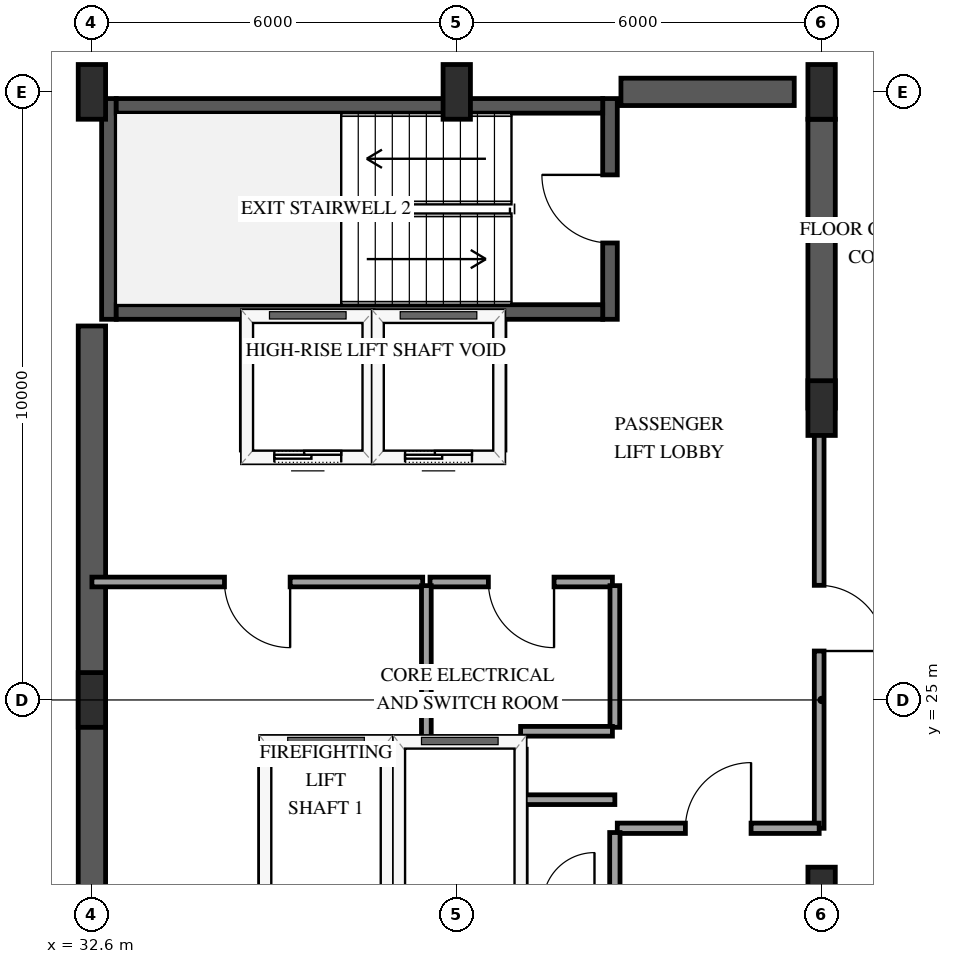
"""IFC4 building model, lengths in metres.
Left out: names, types, materials, properties, quantities, classifications, styles, units other than length and angle.
Written with IfcOpenShell. Run it as: python <this file> out.ifc"""

import sys

from ifc_helpers import new_model, si_unit, direction, frame, frame_2d, origin, origin_2d, place, context, subcontext, project, spatial, rectangle, extrude, element, fill, save


model = new_model("IFC4")
c1 = context("Model", 3, precision=1e-05, world=origin(), true_north=direction((0.0, 1.0)))
c2 = subcontext(c1, "Body", "Model", "MODEL_VIEW")
j1 = project(units=[si_unit("LENGTHUNIT", "METRE"), si_unit("PLANEANGLEUNIT", "RADIAN")], contexts=[c1])
p1 = place(None, origin())
s1 = spatial("IfcSite", under=j1, at=p1, CompositionType="ELEMENT")
p2 = place(p1, origin())
s2 = spatial("IfcBuilding", under=s1, at=p2, CompositionType="ELEMENT")
p3 = place(p2, frame((0.0, 0.0, 257.5)))
s3 = spatial("IfcBuildingStorey", under=s2, at=p3, CompositionType="ELEMENT", Elevation=257.5)
p4 = place(p3, frame((32.88, 31.26, 0.0), z_axis=(0.0, 0.0, 1.0), x_axis=(0.0, 1.0, 0.0)))
e1 = element("IfcWall", 1, at=p4, inside=s3, PredefinedType="SHEAR", context=c2, shape_type="SweptSolid", body=[
    extrude(rectangle(XDim=3.63, YDim=0.24, at=frame_2d((1.815, 0.0))), origin(), (0.0, 0.0, 1.0), 3.75),
])
p5 = place(p3, frame((41.12, 31.26, 0.0), z_axis=(0.0, 0.0, 1.0), x_axis=(0.0, 1.0, 0.0)))
e2 = element("IfcWall", 2, at=p5, inside=s3, PredefinedType="SHEAR", context=c2, shape_type="SweptSolid", body=[
    extrude(rectangle(XDim=3.63, YDim=0.24, at=frame_2d((1.815, 0.0))), origin(), (0.0, 0.0, 1.0), 3.75),
])
p6 = place(p5, frame((1.255, 0.0, 0.0)))
e3 = element("IfcOpeningElement", 3, at=p6, cuts=e2, PredefinedType="OPENING", context=c2, shape_type="SweptSolid", body=[
    extrude(rectangle(XDim=1.12, YDim=2.15, at=frame_2d((0.56, 1.075))), frame((0.0, 0.13, 0.0), z_axis=(0.0, -1.0, 0.0), x_axis=(1.0, 0.0, 0.0)), (0.0, 0.0, 1.0), 0.26),
])
for number, where, z_axis, x_axis in (
    (4, (33.0, 31.38, 0.0), (0.0, 0.0, 1.0), (1.0, 0.0, 0.0)),
    (5, (33.0, 34.77, 0.0), (0.0, 0.0, 1.0), (1.0, 0.0, 0.0)),
):
    element("IfcWall", number, at=place(p3, frame(where, z_axis=z_axis, x_axis=x_axis)), inside=s3, PredefinedType="SHEAR", context=c2, shape_type="SweptSolid", body=[
        extrude(rectangle(XDim=8.0, YDim=0.24, at=frame_2d((4.0, 0.0))), origin(), (0.0, 0.0, 1.0), 3.75),
    ])
p7 = place(p3, frame((32.6, 18.85, 0.0), z_axis=(0.0, 0.0, 1.0), x_axis=(0.0, 1.0, 0.0)))
e6 = element("IfcWall", 6, at=p7, inside=s3, PredefinedType="SHEAR", context=c2, shape_type="SweptSolid", body=[
    extrude(rectangle(XDim=12.3, YDim=0.45, at=frame_2d((6.15, 0.0))), origin(), (0.0, 0.0, 1.0), 3.75),
])
p8 = place(p3, frame((41.3, 35.0, 0.0), z_axis=(0.0, 0.0, 1.0), x_axis=(1.0, 0.0, 0.0)))
e7 = element("IfcWall", 7, at=p8, inside=s3, PredefinedType="SHEAR", context=c2, shape_type="SweptSolid", body=[
    extrude(rectangle(XDim=2.85, YDim=0.45, at=frame_2d((1.425, 0.0))), origin(), (0.0, 0.0, 1.0), 3.75),
])
p9 = place(p3, frame((44.6, 29.8, 0.0), z_axis=(0.0, 0.0, 1.0), x_axis=(0.0, 1.0, 0.0)))
e8 = element("IfcWall", 8, at=p9, inside=s3, PredefinedType="SHEAR", context=c2, shape_type="SweptSolid", body=[
    extrude(rectangle(XDim=4.75, YDim=0.45, at=frame_2d((2.375, 0.0))), origin(), (0.0, 0.0, 1.0), 3.75),
])
for number, where, z_axis, x_axis in (
    (9, (32.6, 25.0, 0.0), (0.0, 0.0, 1.0), (1.0, 0.0, 0.0)),
    (10, (32.6, 35.0, 0.0), (0.0, 0.0, 1.0), (1.0, 0.0, 0.0)),
    (11, (38.6, 35.0, 0.0), (0.0, 0.0, 1.0), (1.0, 0.0, 0.0)),
    (12, (44.6, 21.8, 0.0), (0.0, 0.0, 1.0), (1.0, 0.0, 0.0)),
    (13, (44.6, 29.8, 0.0), (0.0, 0.0, 1.0), (1.0, 0.0, 0.0)),
    (14, (44.6, 35.0, 0.0), (0.0, 0.0, 1.0), (1.0, 0.0, 0.0)),
):
    element("IfcColumn", number, at=place(p3, frame(where, z_axis=z_axis, x_axis=x_axis)), inside=s3, PredefinedType="PILASTER", context=c2, shape_type="SweptSolid", body=[
        extrude(rectangle(XDim=0.45, YDim=0.9, at=origin_2d()), origin(), (0.0, 0.0, 1.0), 3.75),
    ])
p10 = place(p3, frame((35.45, 24.3, 0.0), z_axis=(0.0, 0.0, 1.0), x_axis=(1.0, 0.0, 0.0)))
e15 = element("IfcWall", 15, at=p10, inside=s3, PredefinedType="SOLIDWALL", context=c2, shape_type="SweptSolid", body=[
    extrude(rectangle(XDim=2.0, YDim=0.185, at=frame_2d((1.0, 0.0))), origin(), (0.0, 0.0, 1.0), 2.824),
])
for number, where, z_axis, x_axis in (
    (16, (35.45, 21.81, 0.0), (0.0, 0.0, 1.0), (0.0, 1.0, 0.0)),
    (17, (37.45, 21.81, 0.0), (0.0, 0.0, 1.0), (0.0, 1.0, 0.0)),
):
    element("IfcWall", number, at=place(p3, frame(where, z_axis=z_axis, x_axis=x_axis)), inside=s3, PredefinedType="SOLIDWALL", context=c2, shape_type="SweptSolid", body=[
        extrude(rectangle(XDim=2.38, YDim=0.185, at=frame_2d((1.19, 0.0))), origin(), (0.0, 0.0, 1.0), 3.45),
    ])
p11 = place(p3, frame((37.65, 24.3, 0.0), z_axis=(0.0, 0.0, 1.0), x_axis=(1.0, 0.0, 0.0)))
e18 = element("IfcWall", 18, at=p11, inside=s3, PredefinedType="SOLIDWALL", context=c2, shape_type="SweptSolid", body=[
    extrude(rectangle(XDim=2.0, YDim=0.185, at=frame_2d((1.0, 0.0))), origin(), (0.0, 0.0, 1.0), 2.824),
])
p12 = place(p3, frame((39.65, 21.81, 0.0), z_axis=(0.0, 0.0, 1.0), x_axis=(0.0, 1.0, 0.0)))
e19 = element("IfcWall", 19, at=p12, inside=s3, PredefinedType="SOLIDWALL", context=c2, shape_type="SweptSolid", body=[
    extrude(rectangle(XDim=2.38, YDim=0.185, at=frame_2d((1.19, 0.0))), origin(), (0.0, 0.0, 1.0), 3.45),
])
p13 = place(p3, frame((35.15, 29.0, 0.0), z_axis=(0.0, 0.0, 1.0), x_axis=(1.0, 0.0, 0.0)))
e20 = element("IfcWall", 20, at=p13, inside=s3, PredefinedType="SOLIDWALL", context=c2, shape_type="SweptSolid", body=[
    extrude(rectangle(XDim=2.0, YDim=0.185, at=frame_2d((1.0, 0.0))), origin(), (0.0, 0.0, 1.0), 3.45),
])
p14 = place(p13, frame((0.45, 0.0, 0.0)))
e21 = element("IfcOpeningElement", 21, at=p14, cuts=e20, PredefinedType="OPENING", context=c2, shape_type="SweptSolid", body=[
    extrude(rectangle(XDim=1.1, YDim=2.15, at=frame_2d((0.55, 1.075))), frame((0.0, 0.103, 0.0), z_axis=(0.0, -1.0, 0.0), x_axis=(1.0, 0.0, 0.0)), (0.0, 0.0, 1.0), 0.205),
])
for number, where, z_axis, x_axis in (
    (22, (35.15, 29.11, 0.0), (0.0, 0.0, 1.0), (0.0, 1.0, 0.0)),
    (23, (37.15, 29.11, 0.0), (0.0, 0.0, 1.0), (0.0, 1.0, 0.0)),
):
    element("IfcWall", number, at=place(p3, frame(where, z_axis=z_axis, x_axis=x_axis)), inside=s3, PredefinedType="SOLIDWALL", context=c2, shape_type="SweptSolid", body=[
        extrude(rectangle(XDim=2.1, YDim=0.185, at=frame_2d((1.05, 0.0))), origin(), (0.0, 0.0, 1.0), 3.45),
    ])
p15 = place(p3, frame((37.3, 29.0, 0.0), z_axis=(0.0, 0.0, 1.0), x_axis=(1.0, 0.0, 0.0)))
e24 = element("IfcWall", 24, at=p15, inside=s3, PredefinedType="SOLIDWALL", context=c2, shape_type="SweptSolid", body=[
    extrude(rectangle(XDim=2.0, YDim=0.185, at=frame_2d((1.0, 0.0))), origin(), (0.0, 0.0, 1.0), 3.45),
])
p16 = place(p15, frame((0.45, 0.0, 0.0)))
e25 = element("IfcOpeningElement", 25, at=p16, cuts=e24, PredefinedType="OPENING", context=c2, shape_type="SweptSolid", body=[
    extrude(rectangle(XDim=1.1, YDim=2.15, at=frame_2d((0.55, 1.075))), frame((0.0, 0.103, 0.0), z_axis=(0.0, -1.0, 0.0), x_axis=(1.0, 0.0, 0.0)), (0.0, 0.0, 1.0), 0.205),
])
p17 = place(p3, frame((39.3, 29.11, 0.0), z_axis=(0.0, 0.0, 1.0), x_axis=(0.0, 1.0, 0.0)))
e26 = element("IfcWall", 26, at=p17, inside=s3, PredefinedType="SOLIDWALL", context=c2, shape_type="SweptSolid", body=[
    extrude(rectangle(XDim=2.1, YDim=0.185, at=frame_2d((1.05, 0.0))), origin(), (0.0, 0.0, 1.0), 3.45),
])
p18 = place(p3, frame((44.56, 29.8, 0.0), z_axis=(0.0, 0.0, 1.0), x_axis=(0.0, -1.0, 0.0)))
e27 = element("IfcWall", 27, at=p18, inside=s3, PredefinedType="PARTITIONING", context=c2, shape_type="SweptSolid", body=[
    extrude(rectangle(XDim=6.91, YDim=0.16, at=frame_2d((3.455, 0.0))), origin(), (0.0, 0.0, 1.0), 2.49),
])
p19 = place(p18, frame((2.915, 0.0, 0.0)))
e28 = element("IfcOpeningElement", 28, at=p19, cuts=e27, PredefinedType="OPENING", context=c2, shape_type="SweptSolid", body=[
    extrude(rectangle(XDim=1.08, YDim=2.15, at=frame_2d((0.54, 1.075))), frame((0.0, 0.09, 0.0), z_axis=(0.0, -1.0, 0.0), x_axis=(1.0, 0.0, 0.0)), (0.0, 0.0, 1.0), 0.18),
])
p20 = place(p3, frame((38.04, 26.94, 0.0), z_axis=(0.0, 0.0, 1.0), x_axis=(-1.0, 0.0, 0.0)))
e29 = element("IfcWall", 29, at=p20, inside=s3, PredefinedType="PARTITIONING", context=c2, shape_type="SweptSolid", body=[
    extrude(rectangle(XDim=5.44, YDim=0.16, at=frame_2d((2.72, 0.0))), origin(), (0.0, 0.0, 1.0), 3.45),
])
p21 = place(p20, frame((2.18, 0.0, 0.0)))
e30 = element("IfcOpeningElement", 30, at=p21, cuts=e29, PredefinedType="OPENING", context=c2, shape_type="SweptSolid", body=[
    extrude(rectangle(XDim=1.08, YDim=2.15, at=frame_2d((0.54, 1.075))), frame((0.0, 0.09, 0.0), z_axis=(0.0, -1.0, 0.0), x_axis=(1.0, 0.0, 0.0)), (0.0, 0.0, 1.0), 0.18),
])
p22 = place(p3, frame((41.24, 22.89, 0.0), z_axis=(0.0, 0.0, 1.0), x_axis=(1.0, 0.0, 0.0)))
e31 = element("IfcWall", 31, at=p22, inside=s3, PredefinedType="PARTITIONING", context=c2, shape_type="SweptSolid", body=[
    extrude(rectangle(XDim=3.32, YDim=0.17, at=frame_2d((1.66, 0.0))), origin(), (0.0, 0.0, 1.0), 3.45),
])
p23 = place(p22, frame((1.12, 0.0, 0.0)))
e32 = element("IfcOpeningElement", 32, at=p23, cuts=e31, PredefinedType="OPENING", context=c2, shape_type="SweptSolid", body=[
    extrude(rectangle(XDim=1.08, YDim=2.15, at=frame_2d((0.54, 1.075))), frame((0.0, 0.095, 0.0), z_axis=(0.0, -1.0, 0.0), x_axis=(1.0, 0.0, 0.0)), (0.0, 0.0, 1.0), 0.19),
])
p24 = place(p3, frame((41.16, 26.94, 0.0), z_axis=(0.0, 0.0, 1.0), x_axis=(-1.0, 0.0, 0.0)))
e33 = element("IfcWall", 33, at=p24, inside=s3, PredefinedType="PARTITIONING", context=c2, shape_type="SweptSolid", body=[
    extrude(rectangle(XDim=3.0, YDim=0.16, at=frame_2d((1.5, 0.0))), origin(), (0.0, 0.0, 1.0), 3.45),
])
p25 = place(p24, frame((0.96, 0.0, 0.0)))
e34 = element("IfcOpeningElement", 34, at=p25, cuts=e33, PredefinedType="OPENING", context=c2, shape_type="SweptSolid", body=[
    extrude(rectangle(XDim=1.08, YDim=2.15, at=frame_2d((0.54, 1.075))), frame((0.0, 0.09, 0.0), z_axis=(0.0, -1.0, 0.0), x_axis=(1.0, 0.0, 0.0)), (0.0, 0.0, 1.0), 0.18),
])
p26 = place(p3, frame((38.1, 26.88, 0.0), z_axis=(0.0, 0.0, 1.0), x_axis=(0.0, -1.0, 0.0)))
e35 = element("IfcWall", 35, at=p26, inside=s3, PredefinedType="PARTITIONING", context=c2, shape_type="SweptSolid", body=[
    extrude(rectangle(XDim=2.58, YDim=0.16, at=frame_2d((1.29, 0.0))), origin(), (0.0, 0.0, 1.0), 3.45),
])
p27 = place(p3, frame((41.2, 24.55, 0.0), z_axis=(0.0, 0.0, 1.0), x_axis=(0.0, 1.0, 0.0)))
e36 = element("IfcWall", 36, at=p27, inside=s3, PredefinedType="PARTITIONING", context=c2, shape_type="SweptSolid", body=[
    extrude(rectangle(XDim=2.33, YDim=0.16, at=frame_2d((1.165, 0.0))), origin(), (0.0, 0.0, 1.0), 3.45),
])
p28 = place(p3, frame((39.65, 24.485, 0.0), z_axis=(0.0, 0.0, 1.0), x_axis=(1.0, 0.0, 0.0)))
e37 = element("IfcWall", 37, at=p28, inside=s3, PredefinedType="PARTITIONING", context=c2, shape_type="SweptSolid", body=[
    extrude(rectangle(XDim=1.51, YDim=0.16, at=frame_2d((0.755, 0.0))), origin(), (0.0, 0.0, 1.0), 2.824),
])
p29 = place(p3, frame((41.2, 21.7, 0.0), z_axis=(0.0, 0.0, 1.0), x_axis=(0.0, 1.0, 0.0)))
e38 = element("IfcWall", 38, at=p29, inside=s3, PredefinedType="PARTITIONING", context=c2, shape_type="SweptSolid", body=[
    extrude(rectangle(XDim=1.12, YDim=0.17, at=frame_2d((0.56, 0.0))), origin(), (0.0, 0.0, 1.0), 3.45),
])
p30 = place(p3, frame((41.2, 23.36, 0.0), z_axis=(0.0, 0.0, 1.0), x_axis=(-1.0, 0.0, 0.0)))
e39 = element("IfcWall", 39, at=p30, inside=s3, PredefinedType="PARTITIONING", context=c2, shape_type="SweptSolid", body=[
    extrude(rectangle(XDim=1.48, YDim=0.16, at=frame_2d((0.74, 0.0))), origin(), (0.0, 0.0, 1.0), 3.45),
])
p31 = place(p14, origin())
e40 = element("IfcDoor", 40, at=p31, inside=s3, OperationType="SLIDING_TO_LEFT", PredefinedType="DOOR", context=c2, shape_type="SweptSolid", body=[
    extrude(rectangle(XDim=1.1, YDim=2.15, at=frame_2d((0.55, 1.075))), frame((0.0, 0.025, 0.0), z_axis=(0.0, -1.0, 0.0), x_axis=(1.0, 0.0, 0.0)), (0.0, 0.0, 1.0), 0.05),
])
fill(e21, e40)
p32 = place(p16, origin())
e41 = element("IfcDoor", 41, at=p32, inside=s3, OperationType="SLIDING_TO_LEFT", PredefinedType="DOOR", context=c2, shape_type="SweptSolid", body=[
    extrude(rectangle(XDim=1.1, YDim=2.15, at=frame_2d((0.55, 1.075))), frame((0.0, 0.025, 0.0), z_axis=(0.0, -1.0, 0.0), x_axis=(1.0, 0.0, 0.0)), (0.0, 0.0, 1.0), 0.05),
])
fill(e25, e41)
p33 = place(p6, origin())
e42 = element("IfcDoor", 42, at=p33, inside=s3, OperationType="SINGLE_SWING_RIGHT", PredefinedType="DOOR", context=c2, shape_type="SweptSolid", body=[
    extrude(rectangle(XDim=1.12, YDim=2.15, at=frame_2d((0.56, 1.075))), frame((0.0, 0.025, 0.0), z_axis=(0.0, -1.0, 0.0), x_axis=(1.0, 0.0, 0.0)), (0.0, 0.0, 1.0), 0.05),
])
fill(e3, e42)
p34 = place(p19, origin())
e43 = element("IfcDoor", 43, at=p34, inside=s3, OperationType="SINGLE_SWING_RIGHT", PredefinedType="DOOR", context=c2, shape_type="SweptSolid", body=[
    extrude(rectangle(XDim=1.08, YDim=2.15, at=frame_2d((0.54, 1.075))), frame((0.0, 0.025, 0.0), z_axis=(0.0, -1.0, 0.0), x_axis=(1.0, 0.0, 0.0)), (0.0, 0.0, 1.0), 0.05),
])
fill(e28, e43)
p35 = place(p21, origin())
e44 = element("IfcDoor", 44, at=p35, inside=s3, OperationType="SINGLE_SWING_LEFT", PredefinedType="DOOR", context=c2, shape_type="SweptSolid", body=[
    extrude(rectangle(XDim=1.08, YDim=2.15, at=frame_2d((0.54, 1.075))), frame((0.0, 0.025, 0.0), z_axis=(0.0, -1.0, 0.0), x_axis=(1.0, 0.0, 0.0)), (0.0, 0.0, 1.0), 0.05),
])
fill(e30, e44)
p36 = place(p23, origin())
e45 = element("IfcDoor", 45, at=p36, inside=s3, OperationType="SINGLE_SWING_RIGHT", PredefinedType="DOOR", context=c2, shape_type="SweptSolid", body=[
    extrude(rectangle(XDim=1.08, YDim=2.15, at=frame_2d((0.54, 1.075))), frame((0.0, 0.025, 0.0), z_axis=(0.0, -1.0, 0.0), x_axis=(1.0, 0.0, 0.0)), (0.0, 0.0, 1.0), 0.05),
])
fill(e32, e45)
p37 = place(p25, origin())
e46 = element("IfcDoor", 46, at=p37, inside=s3, OperationType="SINGLE_SWING_LEFT", PredefinedType="DOOR", context=c2, shape_type="SweptSolid", body=[
    extrude(rectangle(XDim=1.08, YDim=2.15, at=frame_2d((0.54, 1.075))), frame((0.0, 0.025, 0.0), z_axis=(0.0, -1.0, 0.0), x_axis=(1.0, 0.0, 0.0)), (0.0, 0.0, 1.0), 0.05),
])
fill(e34, e46)
save(model, sys.argv[1])
